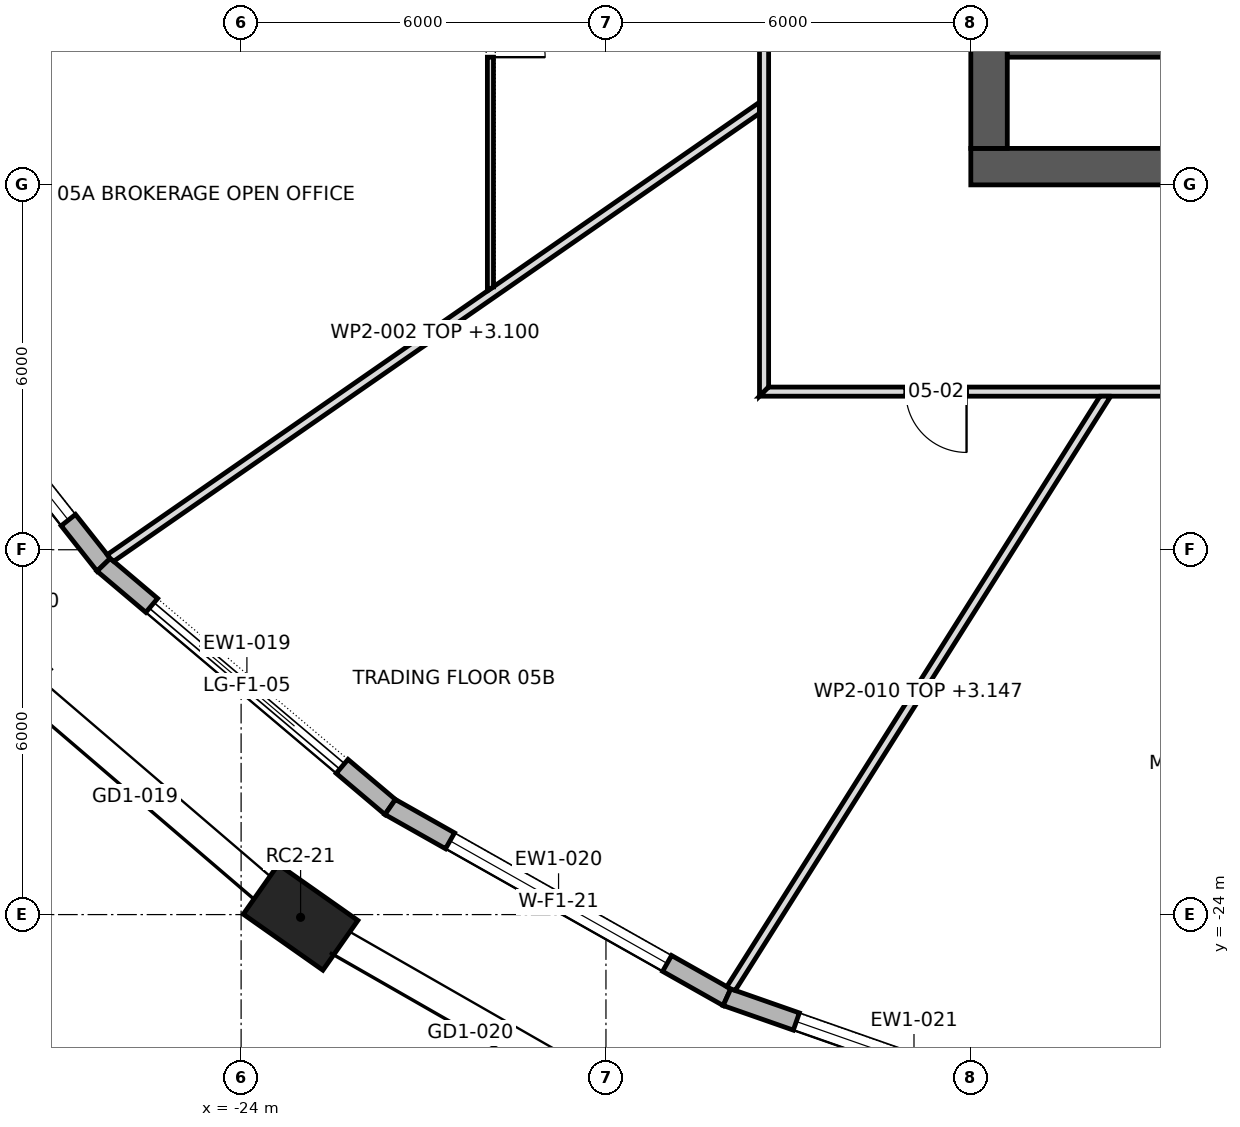
"""IFC4 building model, lengths in metres.
Left out: names, types, materials, properties, quantities, classifications, styles, units other than length and angle.
Written with IfcOpenShell. Run it as: python <this file> out.ifc"""

import sys

from ifc_helpers import new_model, si_unit, direction, frame, frame_2d, origin, origin_2d, place, context, subcontext, project, spatial, polyline, rectangle, outline, extrude, element, fill, save


model = new_model("IFC4")
c1 = context("Model", 3, precision=1e-05, world=origin(), true_north=direction((0.0, 1.0)))
c2 = subcontext(c1, "Body", "Model", "MODEL_VIEW")
j1 = project(units=[si_unit("LENGTHUNIT", "METRE"), si_unit("PLANEANGLEUNIT", "RADIAN")], contexts=[c1])
p1 = place(None, origin())
s1 = spatial("IfcSite", under=j1, at=p1, CompositionType="ELEMENT")
p2 = place(p1, origin())
s2 = spatial("IfcBuilding", under=s1, at=p2, CompositionType="ELEMENT")
p3 = place(p2, frame((0.0, 0.0, 82.3)))
s3 = spatial("IfcBuildingStorey", under=s2, at=p3, CompositionType="ELEMENT", Elevation=82.3)
p4 = place(p3, frame((-23.022, -24.045, 0.0), z_axis=(0.0, 0.0, 1.0), x_axis=(0.817908788019, -0.57534790734, 0.0)))
e1 = element("IfcColumn", 1, at=p4, inside=s3, PredefinedType="COLUMN", context=c2, shape_type="SweptSolid", body=[
    extrude(rectangle(XDim=1.6, YDim=1.0, at=origin_2d()), origin(), (0.0, 0.0, 1.0), 4.2),
])
p5 = place(p3, frame((-12.0, -11.7, 0.0), z_axis=(0.0, 0.0, 1.0), x_axis=(1.0, 0.0, 0.0)))
e2 = element("IfcWall", 2, at=p5, inside=s3, PredefinedType="SHEAR", context=c2, shape_type="SweptSolid", body=[
    extrude(rectangle(XDim=24.0, YDim=0.6, at=frame_2d((12.0, 0.0))), origin(), (0.0, 0.0, 1.0), 4.2),
])
p6 = place(p5, frame((9.975, 0.0, 0.0)))
e3 = element("IfcOpeningElement", 3, at=p6, cuts=e2, PredefinedType="OPENING", context=c2, shape_type="SweptSolid", body=[
    extrude(rectangle(XDim=0.9, YDim=2.1, at=frame_2d((0.45, 1.05))), frame((0.0, 0.312, 0.0), z_axis=(0.0, -1.0, 0.0), x_axis=(1.0, 0.0, 0.0)), (0.0, 0.0, 1.0), 0.624),
])
p7 = place(p5, frame((4.6, 0.0, 0.0)))
e4 = element("IfcOpeningElement", 4, at=p7, cuts=e2, PredefinedType="OPENING", context=c2, shape_type="SweptSolid", body=[
    extrude(rectangle(XDim=0.8, YDim=2.1, at=frame_2d((0.4, 1.05))), frame((0.0, 0.312, 0.0), z_axis=(0.0, -1.0, 0.0), x_axis=(1.0, 0.0, 0.0)), (0.0, 0.0, 1.0), 0.624),
])
p8 = place(p5, frame((7.0, 0.0, 0.0)))
e5 = element("IfcOpeningElement", 5, at=p8, cuts=e2, PredefinedType="OPENING", context=c2, shape_type="SweptSolid", body=[
    extrude(rectangle(XDim=0.8, YDim=2.1, at=frame_2d((0.4, 1.05))), frame((0.0, 0.312, 0.0), z_axis=(0.0, -1.0, 0.0), x_axis=(1.0, 0.0, 0.0)), (0.0, 0.0, 1.0), 0.624),
])
p9 = place(p5, frame((15.85, 0.0, 0.0)))
e6 = element("IfcOpeningElement", 6, at=p9, cuts=e2, PredefinedType="OPENING", context=c2, shape_type="SweptSolid", body=[
    extrude(rectangle(XDim=0.8, YDim=2.1, at=frame_2d((0.4, 1.05))), frame((0.0, 0.312, 0.0), z_axis=(0.0, -1.0, 0.0), x_axis=(1.0, 0.0, 0.0)), (0.0, 0.0, 1.0), 0.624),
])
p10 = place(p3, frame((-11.7, -11.4, 0.0), z_axis=(0.0, 0.0, 1.0), x_axis=(0.0, 1.0, 0.0)))
e7 = element("IfcWall", 7, at=p10, inside=s3, PredefinedType="SHEAR", context=c2, shape_type="SweptSolid", body=[
    extrude(rectangle(XDim=22.8, YDim=0.6, at=frame_2d((11.4, 0.0))), origin(), (0.0, 0.0, 1.0), 4.2),
])
p11 = place(p10, frame((10.2, 0.0, 0.0)))
e8 = element("IfcOpeningElement", 8, at=p11, cuts=e7, PredefinedType="OPENING", context=c2, shape_type="SweptSolid", body=[
    extrude(rectangle(XDim=2.4, YDim=2.1, at=frame_2d((1.2, 1.05))), frame((0.0, 0.312, 0.0), z_axis=(0.0, -1.0, 0.0), x_axis=(1.0, 0.0, 0.0)), (0.0, 0.0, 1.0), 0.624),
])
p12 = place(p10, frame((18.925, 0.0, 0.0)))
e9 = element("IfcOpeningElement", 9, at=p12, cuts=e7, PredefinedType="OPENING", context=c2, shape_type="SweptSolid", body=[
    extrude(rectangle(XDim=1.2, YDim=2.1, at=frame_2d((0.6, 1.05))), frame((0.0, 0.312, 0.0), z_axis=(0.0, -1.0, 0.0), x_axis=(1.0, 0.0, 0.0)), (0.0, 0.0, 1.0), 0.624),
])
p13 = place(p10, frame((2.675, 0.0, 0.0)))
e10 = element("IfcOpeningElement", 10, at=p13, cuts=e7, PredefinedType="OPENING", context=c2, shape_type="SweptSolid", body=[
    extrude(rectangle(XDim=1.2, YDim=2.1, at=frame_2d((0.6, 1.05))), frame((0.0, 0.312, 0.0), z_axis=(0.0, -1.0, 0.0), x_axis=(1.0, 0.0, 0.0)), (0.0, 0.0, 1.0), 0.624),
])
p14 = place(p3, frame((-29.964, -13.562, 0.0), z_axis=(0.0, 0.0, 1.0), x_axis=(0.620093447965, -0.784527957303, 0.0)))
e11 = element("IfcWall", 11, at=p14, inside=s3, PredefinedType="STANDARD", context=c2, shape_type="SweptSolid", body=[
    extrude(outline(polyline([(-0.016, -0.15), (5.988, -0.15), (5.958, 0.15), (0.016, 0.15), (-0.016, -0.15)])), origin(), (0.0, 0.0, 1.0), 3.9),
])
p15 = place(p14, frame((0.937, 0.0, 0.6)))
e12 = element("IfcOpeningElement", 12, at=p15, cuts=e11, PredefinedType="OPENING", context=c2, shape_type="SweptSolid", body=[
    extrude(rectangle(XDim=4.1, YDim=2.85, at=frame_2d((2.05, 1.425))), frame((0.0, 0.162, 0.0), z_axis=(0.0, -1.0, 0.0), x_axis=(1.0, 0.0, 0.0)), (0.0, 0.0, 1.0), 0.324),
])
p16 = place(p3, frame((-26.26, -18.248, 0.0), z_axis=(0.0, 0.0, 1.0), x_axis=(0.763693886759, -0.645578536916, 0.0)))
e13 = element("IfcWall", 13, at=p16, inside=s3, PredefinedType="STANDARD", context=c2, shape_type="SweptSolid", body=[
    extrude(outline(polyline([(-0.015, -0.15), (6.184, -0.15), (6.156, 0.15), (0.015, 0.15), (-0.015, -0.15)])), origin(), (0.0, 0.0, 1.0), 3.9),
])
p17 = place(p16, frame((1.035, 0.0, 0.0)))
e14 = element("IfcOpeningElement", 14, at=p17, cuts=e13, PredefinedType="OPENING", context=c2, shape_type="SweptSolid", body=[
    extrude(rectangle(XDim=4.1, YDim=3.45, at=frame_2d((2.05, 1.725))), frame((0.0, 0.162, 0.0), z_axis=(0.0, -1.0, 0.0), x_axis=(1.0, 0.0, 0.0)), (0.0, 0.0, 1.0), 0.324),
])
p18 = place(p3, frame((-21.549, -22.231, 0.0), z_axis=(0.0, 0.0, 1.0), x_axis=(0.870710061474, -0.491796694629, 0.0)))
e15 = element("IfcWall", 15, at=p18, inside=s3, PredefinedType="STANDARD", context=c2, shape_type="SweptSolid", body=[
    extrude(outline(polyline([(-0.014, -0.15), (6.374, -0.15), (6.347, 0.15), (0.014, 0.15), (-0.014, -0.15)])), origin(), (0.0, 0.0, 1.0), 3.9),
])
p19 = place(p18, frame((1.13, 0.0, 0.6)))
e16 = element("IfcOpeningElement", 16, at=p19, cuts=e15, PredefinedType="OPENING", context=c2, shape_type="SweptSolid", body=[
    extrude(rectangle(XDim=4.1, YDim=2.85, at=frame_2d((2.05, 1.425))), frame((0.0, 0.162, 0.0), z_axis=(0.0, -1.0, 0.0), x_axis=(1.0, 0.0, 0.0)), (0.0, 0.0, 1.0), 0.324),
])
p20 = place(p3, frame((-16.01, -25.359, 0.0), z_axis=(0.0, 0.0, 1.0), x_axis=(0.943815136299, -0.330473884736, 0.0)))
e17 = element("IfcWall", 17, at=p20, inside=s3, PredefinedType="STANDARD", context=c2, shape_type="SweptSolid", body=[
    extrude(outline(polyline([(-0.013, -0.15), (6.531, -0.15), (6.505, 0.15), (0.013, 0.15), (-0.013, -0.15)])), origin(), (0.0, 0.0, 1.0), 3.9),
])
p21 = place(p20, frame((1.209, 0.0, 0.6)))
e18 = element("IfcOpeningElement", 18, at=p21, cuts=e17, PredefinedType="OPENING", context=c2, shape_type="SweptSolid", body=[
    extrude(rectangle(XDim=4.1, YDim=2.85, at=frame_2d((2.05, 1.425))), frame((0.0, 0.162, 0.0), z_axis=(0.0, -1.0, 0.0), x_axis=(1.0, 0.0, 0.0)), (0.0, 0.0, 1.0), 0.324),
])
p22 = place(p3, frame((-11.4, -9.825, 0.0), z_axis=(0.0, 0.0, 1.0), x_axis=(1.0, 0.0, 0.0)))
e19 = element("IfcWall", 19, at=p22, inside=s3, PredefinedType="SHEAR", context=c2, shape_type="SweptSolid", body=[
    extrude(rectangle(XDim=8.0, YDim=0.15, at=frame_2d((4.0, 0.0))), origin(), (0.0, 0.0, 1.0), 3.9),
])
p23 = place(p3, frame((-26.158, -18.142, 0.0), z_axis=(0.0, 0.0, 1.0), x_axis=(0.821670699987, 0.569962508226, 0.0)))
e20 = element("IfcWall", 20, at=p23, inside=s3, PredefinedType="PARTITIONING", context=c2, shape_type="SweptSolid", body=[
    extrude(outline(polyline([(0.024, -0.075), (1.87, -0.075), (3.717, -0.075), (5.563, -0.075), (7.41, -0.075), (9.257, -0.075), (11.103, -0.075), (12.95, -0.075), (13.003, 0.002), (13.003, 0.002), (13.053, 0.074), (13.053, 0.075), (11.279, 0.075), (9.504, 0.075), (7.729, 0.075), (7.728, 0.073), (7.726, 0.075), (5.794, 0.075), (3.863, 0.075), (1.931, 0.075), (0.0, 0.075), (0.0, 0.073), (0.005, -0.004), (0.024, -0.075)])), origin(), (0.0, 0.0, 1.0), 3.1),
])
p24 = place(p3, frame((-19.9, -13.744, 0.0), z_axis=(0.0, 0.0, 1.0), x_axis=(0.0, 1.0, 0.0)))
e21 = element("IfcWall", 21, at=p24, inside=s3, PredefinedType="PARTITIONING", context=c2, shape_type="SweptSolid", body=[
    extrude(outline(polyline([(0.069, -0.05), (1.976, -0.05), (3.882, -0.05), (5.788, -0.05), (7.695, -0.05), (9.601, -0.05), (11.508, -0.05), (13.414, -0.05), (15.321, -0.05), (15.329, 0.049), (15.329, 0.05), (13.644, 0.05), (11.958, 0.05), (10.273, 0.05), (8.588, 0.05), (8.58, 0.048), (8.58, 0.05), (6.864, 0.05), (5.148, 0.05), (3.432, 0.05), (1.716, 0.05), (0.0, 0.05), (0.0, 0.05), (0.069, -0.05)])), origin(), (0.0, 0.0, 1.0), 3.9),
])
p25 = place(p24, frame((3.844, 0.0, 0.0)))
e22 = element("IfcOpeningElement", 22, at=p25, cuts=e21, PredefinedType="OPENING", context=c2, shape_type="SweptSolid", body=[
    extrude(rectangle(XDim=0.9, YDim=2.1, at=frame_2d((0.45, 1.05))), frame((0.0, 0.062, 0.0), z_axis=(0.0, -1.0, 0.0), x_axis=(1.0, 0.0, 0.0)), (0.0, 0.0, 1.0), 0.124),
])
p26 = place(p24, frame((13.294, 0.0, 0.0)))
e23 = element("IfcOpeningElement", 23, at=p26, cuts=e21, PredefinedType="OPENING", context=c2, shape_type="SweptSolid", body=[
    extrude(rectangle(XDim=0.9, YDim=2.1, at=frame_2d((0.45, 1.05))), frame((0.0, 0.062, 0.0), z_axis=(0.0, -1.0, 0.0), x_axis=(1.0, 0.0, 0.0)), (0.0, 0.0, 1.0), 0.124),
])
p27 = place(p3, frame((-15.4, -15.475, 0.0), z_axis=(0.0, 0.0, 1.0), x_axis=(0.0, 1.0, 0.0)))
e24 = element("IfcWall", 24, at=p27, inside=s3, PredefinedType="PARTITIONING", context=c2, shape_type="SweptSolid", body=[
    extrude(outline(polyline([(0.15, -0.075), (2.066, -0.075), (3.981, -0.075), (5.897, -0.075), (7.812, -0.075), (9.728, -0.075), (11.644, -0.075), (13.56, -0.075), (15.475, -0.075), (17.391, -0.075), (19.306, -0.075), (21.222, -0.075), (23.138, -0.075), (25.053, -0.075), (26.969, -0.075), (28.885, -0.075), (30.8, -0.075), (30.95, 0.075), (29.016, 0.075), (27.081, 0.075), (25.147, 0.075), (23.212, 0.075), (21.278, 0.075), (19.344, 0.075), (17.409, 0.075), (15.475, 0.075), (13.541, 0.075), (11.606, 0.075), (9.672, 0.075), (7.738, 0.075), (5.803, 0.075), (3.869, 0.075), (1.935, 0.075), (0.0, 0.075), (0.15, -0.075)])), origin(), (0.0, 0.0, 1.0), 3.9),
])
p28 = place(p27, frame((10.275, 0.0, 0.0)))
e25 = element("IfcOpeningElement", 25, at=p28, cuts=e24, PredefinedType="OPENING", context=c2, shape_type="SweptSolid", body=[
    extrude(rectangle(XDim=1.0, YDim=2.1, at=frame_2d((0.5, 1.05))), frame((0.0, 0.087, 0.0), z_axis=(0.0, -1.0, 0.0), x_axis=(1.0, 0.0, 0.0)), (0.0, 0.0, 1.0), 0.174),
])
p29 = place(p27, frame((22.915, 0.0, 0.0)))
e26 = element("IfcOpeningElement", 26, at=p29, cuts=e24, PredefinedType="OPENING", context=c2, shape_type="SweptSolid", body=[
    extrude(rectangle(XDim=1.8, YDim=2.1, at=frame_2d((0.9, 1.05))), frame((0.0, 0.087, 0.0), z_axis=(0.0, -1.0, 0.0), x_axis=(1.0, 0.0, 0.0)), (0.0, 0.0, 1.0), 0.174),
])
p30 = place(p3, frame((-15.475, -15.4, 0.0), z_axis=(0.0, 0.0, 1.0), x_axis=(1.0, 0.0, 0.0)))
e27 = element("IfcWall", 27, at=p30, inside=s3, PredefinedType="PARTITIONING", context=c2, shape_type="SweptSolid", body=[
    extrude(outline(polyline([(0.0, -0.075), (1.935, -0.075), (3.869, -0.075), (5.803, -0.075), (7.738, -0.075), (9.672, -0.075), (11.606, -0.075), (13.541, -0.075), (15.475, -0.075), (17.409, -0.075), (19.344, -0.075), (21.278, -0.075), (23.212, -0.075), (25.147, -0.075), (27.081, -0.075), (29.016, -0.075), (30.95, -0.075), (30.8, 0.075), (28.885, 0.075), (26.969, 0.075), (25.053, 0.075), (23.138, 0.075), (21.222, 0.075), (19.306, 0.075), (17.391, 0.075), (15.475, 0.075), (13.56, 0.075), (11.644, 0.075), (9.728, 0.075), (7.812, 0.075), (5.897, 0.075), (3.981, 0.075), (2.066, 0.075), (0.15, 0.075), (0.0, -0.075)])), origin(), (0.0, 0.0, 1.0), 3.9),
])
p31 = place(p30, frame((2.405, 0.0, 0.0)))
e28 = element("IfcOpeningElement", 28, at=p31, cuts=e27, PredefinedType="OPENING", context=c2, shape_type="SweptSolid", body=[
    extrude(rectangle(XDim=1.0, YDim=2.1, at=frame_2d((0.5, 1.05))), frame((0.0, 0.087, 0.0), z_axis=(0.0, -1.0, 0.0), x_axis=(1.0, 0.0, 0.0)), (0.0, 0.0, 1.0), 0.174),
])
p32 = place(p30, frame((12.47, 0.0, 0.0)))
e29 = element("IfcOpeningElement", 29, at=p32, cuts=e27, PredefinedType="OPENING", context=c2, shape_type="SweptSolid", body=[
    extrude(rectangle(XDim=1.8, YDim=2.1, at=frame_2d((0.9, 1.05))), frame((0.0, 0.087, 0.0), z_axis=(0.0, -1.0, 0.0), x_axis=(1.0, 0.0, 0.0)), (0.0, 0.0, 1.0), 0.174),
])
p33 = place(p30, frame((25.04, 0.0, 0.0)))
e30 = element("IfcOpeningElement", 30, at=p33, cuts=e27, PredefinedType="OPENING", context=c2, shape_type="SweptSolid", body=[
    extrude(rectangle(XDim=1.8, YDim=2.1, at=frame_2d((0.9, 1.05))), frame((0.0, 0.087, 0.0), z_axis=(0.0, -1.0, 0.0), x_axis=(1.0, 0.0, 0.0)), (0.0, 0.0, 1.0), 0.174),
])
p34 = place(p3, frame((-9.762, -15.435, 0.0), z_axis=(0.0, 0.0, 1.0), x_axis=(-0.534199196173, -0.845358633249, 0.0)))
e31 = element("IfcWall", 31, at=p34, inside=s3, PredefinedType="PARTITIONING", context=c2, shape_type="SweptSolid", body=[
    extrude(outline(polyline([(11.581, -0.075), (11.581, -0.066), (11.578, -0.001), (11.56, 0.075), (9.633, 0.075), (7.707, 0.075), (5.78, 0.075), (3.853, 0.075), (1.927, 0.075), (0.0, 0.075), (0.0, 0.075), (0.095, -0.075), (2.009, -0.075), (3.923, -0.075), (5.838, -0.075), (7.752, -0.075), (9.667, -0.075), (11.581, -0.075)])), origin(), (0.0, 0.0, 1.0), 3.147),
])
p35 = place(p15, origin())
e32 = element("IfcWindow", 32, at=p35, inside=s3, PartitioningType="TRIPLE_PANEL_VERTICAL", PredefinedType="WINDOW", context=c2, shape_type="SweptSolid", body=[
    extrude(rectangle(XDim=4.1, YDim=2.85, at=frame_2d((2.05, 1.425))), frame((0.0, 0.03, 0.0), z_axis=(0.0, -1.0, 0.0), x_axis=(1.0, 0.0, 0.0)), (0.0, 0.0, 1.0), 0.06),
])
fill(e12, e32)
p36 = place(p17, origin())
e33 = element("IfcDoor", 33, at=p36, inside=s3, OperationType="DOUBLE_DOOR_SLIDING", PredefinedType="DOOR", context=c2, shape_type="SweptSolid", body=[
    extrude(rectangle(XDim=4.1, YDim=3.45, at=frame_2d((2.05, 1.725))), frame((0.0, 0.025, 0.0), z_axis=(0.0, -1.0, 0.0), x_axis=(1.0, 0.0, 0.0)), (0.0, 0.0, 1.0), 0.05),
])
fill(e14, e33)
p37 = place(p19, origin())
e34 = element("IfcWindow", 34, at=p37, inside=s3, PartitioningType="TRIPLE_PANEL_VERTICAL", PredefinedType="WINDOW", context=c2, shape_type="SweptSolid", body=[
    extrude(rectangle(XDim=4.1, YDim=2.85, at=frame_2d((2.05, 1.425))), frame((0.0, 0.03, 0.0), z_axis=(0.0, -1.0, 0.0), x_axis=(1.0, 0.0, 0.0)), (0.0, 0.0, 1.0), 0.06),
])
fill(e16, e34)
p38 = place(p21, origin())
e35 = element("IfcWindow", 35, at=p38, inside=s3, PartitioningType="TRIPLE_PANEL_VERTICAL", PredefinedType="WINDOW", context=c2, shape_type="SweptSolid", body=[
    extrude(rectangle(XDim=4.1, YDim=2.85, at=frame_2d((2.05, 1.425))), frame((0.0, 0.03, 0.0), z_axis=(0.0, -1.0, 0.0), x_axis=(1.0, 0.0, 0.0)), (0.0, 0.0, 1.0), 0.06),
])
fill(e18, e35)
p39 = place(p31, frame((1.0, 0.0, 0.0), z_axis=(0.0, 0.0, 1.0), x_axis=(-1.0, 0.0, 0.0)))
e36 = element("IfcDoor", 36, at=p39, inside=s3, OperationType="SINGLE_SWING_RIGHT", PredefinedType="DOOR", context=c2, shape_type="SweptSolid", body=[
    extrude(rectangle(XDim=1.0, YDim=2.1, at=frame_2d((0.5, 1.05))), frame((0.0, 0.025, 0.0), z_axis=(0.0, -1.0, 0.0), x_axis=(1.0, 0.0, 0.0)), (0.0, 0.0, 1.0), 0.05),
])
fill(e28, e36)
p40 = place(p25, frame((0.9, 0.0, 0.0), z_axis=(0.0, 0.0, 1.0), x_axis=(-1.0, 0.0, 0.0)))
e37 = element("IfcDoor", 37, at=p40, inside=s3, OperationType="SINGLE_SWING_LEFT", PredefinedType="DOOR", context=c2, shape_type="SweptSolid", body=[
    extrude(rectangle(XDim=0.9, YDim=2.1, at=frame_2d((0.45, 1.05))), frame((0.0, 0.025, 0.0), z_axis=(0.0, -1.0, 0.0), x_axis=(1.0, 0.0, 0.0)), (0.0, 0.0, 1.0), 0.05),
])
fill(e22, e37)
save(model, sys.argv[1])
